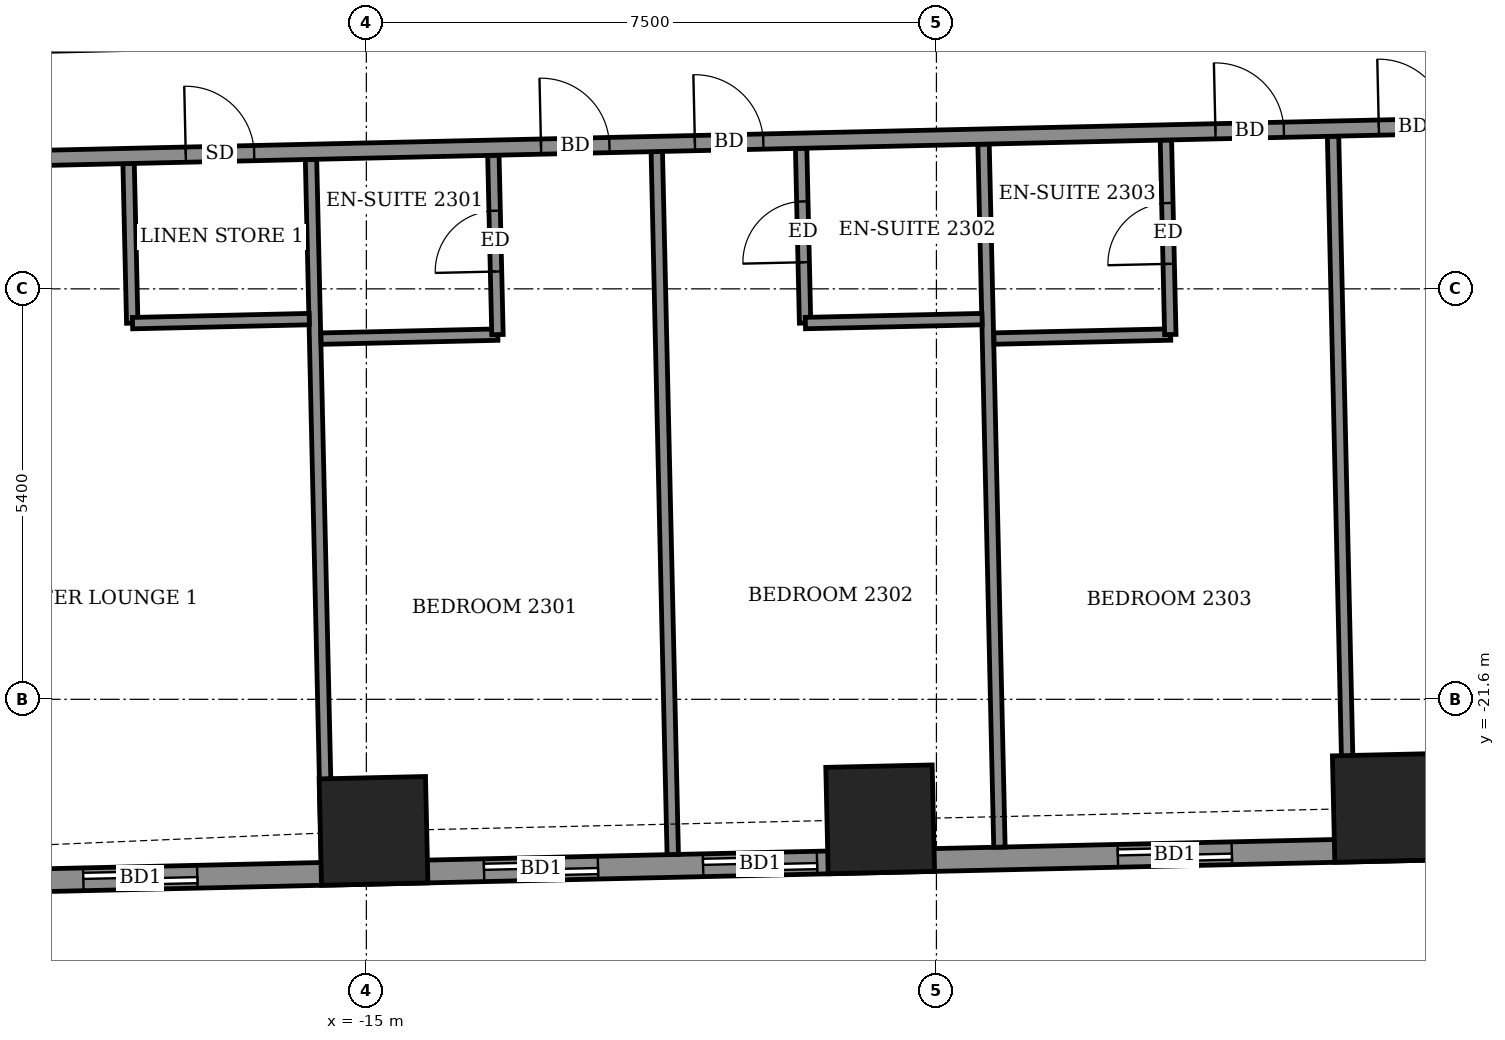
"""IFC4 building model, lengths in metres.
Left out: names, types, materials, properties, quantities, classifications, styles, units other than length and angle.
Written with IfcOpenShell. Run it as: python <this file> out.ifc"""

import sys

from ifc_helpers import new_model, si_unit, direction, frame, frame_2d, origin, origin_2d, place, context, subcontext, project, spatial, rectangle, extrude, element, fill, save


model = new_model("IFC4")
c1 = context("Model", 3, precision=1e-05, world=origin(), true_north=direction((0.0, 1.0)))
c2 = subcontext(c1, "Body", "Model", "MODEL_VIEW")
j1 = project(units=[si_unit("LENGTHUNIT", "METRE"), si_unit("PLANEANGLEUNIT", "RADIAN")], contexts=[c1])
p1 = place(None, origin())
s1 = spatial("IfcSite", under=j1, at=p1, CompositionType="ELEMENT")
p2 = place(p1, origin())
s2 = spatial("IfcBuilding", under=s1, at=p2, CompositionType="ELEMENT")
p3 = place(p2, frame((0.0, 0.0, 93.7)))
s3 = spatial("IfcBuildingStorey", under=s2, at=p3, CompositionType="ELEMENT", Elevation=93.7)
for number, where, z_axis, x_axis in (
    (1, (-14.906, -23.331, -0.55), (0.0, 0.0, 1.0), (1.0, 0.023, 0.0)),
    (2, (-8.24, -23.179, -0.55), (0.0, 0.0, 1.0), (1.0, 0.023, 0.0)),
    (3, (-1.575, -23.028, -0.55), (0.0, 0.0, 1.0), (1.0, 0.023, 0.0)),
):
    element("IfcColumn", number, at=place(p3, frame(where, z_axis=z_axis, x_axis=x_axis)), inside=s3, PredefinedType="COLUMN", context=c2, shape_type="SweptSolid", body=[
        extrude(rectangle(XDim=1.4, YDim=1.4, at=origin_2d()), origin(), (0.0, 0.0, 1.0), 3.6),
    ])
p4 = place(p3, frame((-21.409, -24.029, 0.0), z_axis=(0.0, 0.0, 1.0), x_axis=(0.999742634032, 0.022686244721, 0.0)))
e4 = element("IfcWall", 4, at=p4, inside=s3, PredefinedType="SOLIDWALL", context=c2, shape_type="SweptSolid", body=[
    extrude(rectangle(XDim=46.372, YDim=0.3, at=frame_2d((23.186, 0.0))), origin(), (0.0, 0.0, 1.0), 3.05),
])
p5 = place(p4, frame((2.686, 0.0, 0.0)))
e5 = element("IfcOpeningElement", 5, at=p5, cuts=e4, PredefinedType="OPENING", context=c2, shape_type="SweptSolid", body=[
    extrude(rectangle(XDim=1.5, YDim=2.4, at=frame_2d((0.75, 1.2))), frame((0.0, 0.16, 0.0), z_axis=(0.0, -1.0, 0.0), x_axis=(1.0, 0.0, 0.0)), (0.0, 0.0, 1.0), 0.32),
])
p6 = place(p4, frame((7.959, 0.0, 0.0)))
e6 = element("IfcOpeningElement", 6, at=p6, cuts=e4, PredefinedType="OPENING", context=c2, shape_type="SweptSolid", body=[
    extrude(rectangle(XDim=1.5, YDim=2.4, at=frame_2d((0.75, 1.2))), frame((0.0, 0.16, 0.0), z_axis=(0.0, -1.0, 0.0), x_axis=(1.0, 0.0, 0.0)), (0.0, 0.0, 1.0), 0.32),
])
p7 = place(p4, frame((10.842, 0.0, 0.0)))
e7 = element("IfcOpeningElement", 7, at=p7, cuts=e4, PredefinedType="OPENING", context=c2, shape_type="SweptSolid", body=[
    extrude(rectangle(XDim=1.5, YDim=2.4, at=frame_2d((0.75, 1.2))), frame((0.0, 0.16, 0.0), z_axis=(0.0, -1.0, 0.0), x_axis=(1.0, 0.0, 0.0)), (0.0, 0.0, 1.0), 0.32),
])
p8 = place(p4, frame((16.3, 0.0, 0.0)))
e8 = element("IfcOpeningElement", 8, at=p8, cuts=e4, PredefinedType="OPENING", context=c2, shape_type="SweptSolid", body=[
    extrude(rectangle(XDim=1.5, YDim=2.4, at=frame_2d((0.75, 1.2))), frame((0.0, 0.16, 0.0), z_axis=(0.0, -1.0, 0.0), x_axis=(1.0, 0.0, 0.0)), (0.0, 0.0, 1.0), 0.32),
])
p9 = place(p4, frame((21.326, 0.0, 0.0)))
e9 = element("IfcOpeningElement", 9, at=p9, cuts=e4, PredefinedType="OPENING", context=c2, shape_type="SweptSolid", body=[
    extrude(rectangle(XDim=1.5, YDim=2.4, at=frame_2d((0.75, 1.2))), frame((0.0, 0.16, 0.0), z_axis=(0.0, -1.0, 0.0), x_axis=(1.0, 0.0, 0.0)), (0.0, 0.0, 1.0), 0.32),
])
p10 = place(p4, frame((24.21, 0.0, 0.0)))
e10 = element("IfcOpeningElement", 10, at=p10, cuts=e4, PredefinedType="OPENING", context=c2, shape_type="SweptSolid", body=[
    extrude(rectangle(XDim=1.5, YDim=2.4, at=frame_2d((0.75, 1.2))), frame((0.0, 0.16, 0.0), z_axis=(0.0, -1.0, 0.0), x_axis=(1.0, 0.0, 0.0)), (0.0, 0.0, 1.0), 0.32),
])
p11 = place(p4, frame((29.769, 0.0, 0.0)))
e11 = element("IfcOpeningElement", 11, at=p11, cuts=e4, PredefinedType="OPENING", context=c2, shape_type="SweptSolid", body=[
    extrude(rectangle(XDim=1.5, YDim=2.4, at=frame_2d((0.75, 1.2))), frame((0.0, 0.16, 0.0), z_axis=(0.0, -1.0, 0.0), x_axis=(1.0, 0.0, 0.0)), (0.0, 0.0, 1.0), 0.32),
])
p12 = place(p4, frame((34.819, 0.0, 0.0)))
e12 = element("IfcOpeningElement", 12, at=p12, cuts=e4, PredefinedType="OPENING", context=c2, shape_type="SweptSolid", body=[
    extrude(rectangle(XDim=1.5, YDim=2.4, at=frame_2d((0.75, 1.2))), frame((0.0, 0.16, 0.0), z_axis=(0.0, -1.0, 0.0), x_axis=(1.0, 0.0, 0.0)), (0.0, 0.0, 1.0), 0.32),
])
p13 = place(p4, frame((37.852, 0.0, 0.0)))
e13 = element("IfcOpeningElement", 13, at=p13, cuts=e4, PredefinedType="OPENING", context=c2, shape_type="SweptSolid", body=[
    extrude(rectangle(XDim=1.2, YDim=2.4, at=frame_2d((0.6, 1.2))), frame((0.0, 0.16, 0.0), z_axis=(0.0, -1.0, 0.0), x_axis=(1.0, 0.0, 0.0)), (0.0, 0.0, 1.0), 0.32),
])
p14 = place(p4, frame((42.373, 0.0, 0.9)))
e14 = element("IfcOpeningElement", 14, at=p14, cuts=e4, PredefinedType="OPENING", context=c2, shape_type="SweptSolid", body=[
    extrude(rectangle(XDim=2.4, YDim=1.5, at=frame_2d((1.2, 0.75))), frame((0.0, 0.16, 0.0), z_axis=(0.0, -1.0, 0.0), x_axis=(1.0, 0.0, 0.0)), (0.0, 0.0, 1.0), 0.32),
])
p15 = place(p3, frame((-15.518, -23.745, 0.0), z_axis=(0.0, 0.0, 1.0), x_axis=(-0.022697424684, 0.999742380272, 0.0)))
e15 = element("IfcWall", 15, at=p15, inside=s3, PredefinedType="PARTITIONING", context=c2, shape_type="SweptSolid", body=[
    extrude(rectangle(XDim=9.25, YDim=0.15, at=frame_2d((4.625, 0.0))), origin(), (0.0, 0.0, 1.0), 3.05),
])
p16 = place(p3, frame((-10.969, -23.642, 0.0), z_axis=(0.0, 0.0, 1.0), x_axis=(-0.022697424684, 0.999742380272, 0.0)))
e16 = element("IfcWall", 16, at=p16, inside=s3, PredefinedType="PARTITIONING", context=c2, shape_type="SweptSolid", body=[
    extrude(rectangle(XDim=9.25, YDim=0.15, at=frame_2d((4.625, 0.0))), origin(), (0.0, 0.0, 1.0), 2.55),
])
p17 = place(p3, frame((-6.671, -23.545, 0.0), z_axis=(0.0, 0.0, 1.0), x_axis=(-0.022592505393, 0.999744756775, 0.0)))
e17 = element("IfcWall", 17, at=p17, inside=s3, PredefinedType="PARTITIONING", context=c2, shape_type="SweptSolid", body=[
    extrude(rectangle(XDim=9.25, YDim=0.15, at=frame_2d((4.625, 0.0))), origin(), (0.0, 0.0, 1.0), 2.55),
])
p18 = place(p3, frame((-2.072, -23.44, 0.0), z_axis=(0.0, 0.0, 1.0), x_axis=(-0.022697424684, 0.999742380272, 0.0)))
e18 = element("IfcWall", 18, at=p18, inside=s3, PredefinedType="PARTITIONING", context=c2, shape_type="SweptSolid", body=[
    extrude(rectangle(XDim=9.25, YDim=0.15, at=frame_2d((4.625, 0.0))), origin(), (0.0, 0.0, 1.0), 3.05),
])
p19 = place(p3, frame((-6.743, -16.854, 0.0), z_axis=(0.0, 0.0, 1.0), x_axis=(0.999740260747, 0.02279059109, 0.0)))
e19 = element("IfcWall", 19, at=p19, inside=s3, PredefinedType="PARTITIONING", context=c2, shape_type="SweptSolid", body=[
    extrude(rectangle(XDim=2.324, YDim=0.15, at=frame_2d((1.162, 0.0))), origin(), (0.0, 0.0, 1.0), 3.05),
])
p20 = place(p3, frame((-4.423, -16.801, 0.0), z_axis=(0.0, 0.0, 1.0), x_axis=(-0.022604411713, 0.999744487642, 0.0)))
e20 = element("IfcWall", 20, at=p20, inside=s3, PredefinedType="PARTITIONING", context=c2, shape_type="SweptSolid", body=[
    extrude(rectangle(XDim=2.56, YDim=0.15, at=frame_2d((1.28, 0.0))), origin(), (0.0, 0.0, 1.0), 3.05),
])
p21 = place(p20, frame((0.93, 0.0, 0.0)))
e21 = element("IfcOpeningElement", 21, at=p21, cuts=e20, PredefinedType="OPENING", context=c2, shape_type="SweptSolid", body=[
    extrude(rectangle(XDim=0.8, YDim=2.1, at=frame_2d((0.4, 1.05))), frame((0.0, 0.085, 0.0), z_axis=(0.0, -1.0, 0.0), x_axis=(1.0, 0.0, 0.0)), (0.0, 0.0, 1.0), 0.17),
])
p22 = place(p3, frame((-15.596, -16.855, 0.0), z_axis=(0.0, 0.0, 1.0), x_axis=(0.999740478815, 0.022781023197, 0.0)))
e22 = element("IfcWall", 22, at=p22, inside=s3, PredefinedType="PARTITIONING", context=c2, shape_type="SweptSolid", body=[
    extrude(rectangle(XDim=2.325, YDim=0.15, at=frame_2d((1.163, 0.0))), origin(), (0.0, 0.0, 1.0), 3.05),
])
p23 = place(p3, frame((-13.275, -16.802, 0.0), z_axis=(0.0, 0.0, 1.0), x_axis=(-0.02297054684, 0.999736142178, 0.0)))
e23 = element("IfcWall", 23, at=p23, inside=s3, PredefinedType="PARTITIONING", context=c2, shape_type="SweptSolid", body=[
    extrude(rectangle(XDim=2.36, YDim=0.15, at=frame_2d((1.18, 0.0))), origin(), (0.0, 0.0, 1.0), 3.05),
])
p24 = place(p23, frame((0.83, 0.0, 0.0)))
e24 = element("IfcOpeningElement", 24, at=p24, cuts=e23, PredefinedType="OPENING", context=c2, shape_type="SweptSolid", body=[
    extrude(rectangle(XDim=0.8, YDim=2.1, at=frame_2d((0.4, 1.05))), frame((0.0, 0.085, 0.0), z_axis=(0.0, -1.0, 0.0), x_axis=(1.0, 0.0, 0.0)), (0.0, 0.0, 1.0), 0.17),
])
p25 = place(p3, frame((-9.228, -16.65, 0.0), z_axis=(0.0, 0.0, 1.0), x_axis=(-0.022615284993, 0.999744241736, 0.0)))
e25 = element("IfcWall", 25, at=p25, inside=s3, PredefinedType="PARTITIONING", context=c2, shape_type="SweptSolid", body=[
    extrude(rectangle(XDim=2.299, YDim=0.15, at=frame_2d((1.15, 0.0))), origin(), (0.0, 0.0, 1.0), 3.05),
])
p26 = place(p25, frame((0.8, 0.0, 0.0)))
e26 = element("IfcOpeningElement", 26, at=p26, cuts=e25, PredefinedType="OPENING", context=c2, shape_type="SweptSolid", body=[
    extrude(rectangle(XDim=0.8, YDim=2.1, at=frame_2d((0.4, 1.05))), frame((0.0, 0.085, 0.0), z_axis=(0.0, -1.0, 0.0), x_axis=(1.0, 0.0, 0.0)), (0.0, 0.0, 1.0), 0.17),
])
p27 = place(p3, frame((-9.224, -16.65, 0.0), z_axis=(0.0, 0.0, 1.0), x_axis=(0.999750007167, 0.022358961731, 0.0)))
e27 = element("IfcWall", 27, at=p27, inside=s3, PredefinedType="PARTITIONING", context=c2, shape_type="SweptSolid", body=[
    extrude(rectangle(XDim=2.326, YDim=0.15, at=frame_2d((1.163, 0.0))), origin(), (0.0, 0.0, 1.0), 3.05),
])
p28 = place(p3, frame((-18.08, -16.651, 0.0), z_axis=(0.0, 0.0, 1.0), x_axis=(-0.022792727877, 0.999740212033, 0.0)))
e28 = element("IfcWall", 28, at=p28, inside=s3, PredefinedType="PARTITIONING", context=c2, shape_type="SweptSolid", body=[
    extrude(rectangle(XDim=2.099, YDim=0.15, at=frame_2d((1.05, 0.0))), origin(), (0.0, 0.0, 1.0), 3.05),
])
p29 = place(p3, frame((-18.076, -16.651, 0.0), z_axis=(0.0, 0.0, 1.0), x_axis=(0.999740478815, 0.022781023197, 0.0)))
e29 = element("IfcWall", 29, at=p29, inside=s3, PredefinedType="PARTITIONING", context=c2, shape_type="SweptSolid", body=[
    extrude(rectangle(XDim=2.325, YDim=0.15, at=frame_2d((1.163, 0.0))), origin(), (0.0, 0.0, 1.0), 3.05),
])
p30 = place(p3, frame((-24.274, -14.591, 0.0), z_axis=(0.0, 0.0, 1.0), x_axis=(0.999742718753, 0.022682510909, 0.0)))
e30 = element("IfcWall", 30, at=p30, inside=s3, PredefinedType="PARTITIONING", context=c2, shape_type="SweptSolid", body=[
    extrude(rectangle(XDim=52.471, YDim=0.2, at=frame_2d((26.236, 0.0))), origin(), (0.0, 0.0, 1.0), 3.05),
])
p31 = place(p30, frame((1.525, 0.0, 0.0)))
e31 = element("IfcOpeningElement", 31, at=p31, cuts=e30, PredefinedType="OPENING", context=c2, shape_type="SweptSolid", body=[
    extrude(rectangle(XDim=1.0, YDim=2.1, at=frame_2d((0.5, 1.05))), frame((0.0, 0.11, 0.0), z_axis=(0.0, -1.0, 0.0), x_axis=(1.0, 0.0, 0.0)), (0.0, 0.0, 1.0), 0.22),
])
p32 = place(p30, frame((6.9, 0.0, 0.0)))
e32 = element("IfcOpeningElement", 32, at=p32, cuts=e30, PredefinedType="OPENING", context=c2, shape_type="SweptSolid", body=[
    extrude(rectangle(XDim=0.9, YDim=2.1, at=frame_2d((0.45, 1.05))), frame((0.0, 0.11, 0.0), z_axis=(0.0, -1.0, 0.0), x_axis=(1.0, 0.0, 0.0)), (0.0, 0.0, 1.0), 0.22),
])
p33 = place(p30, frame((11.575, 0.0, 0.0)))
e33 = element("IfcOpeningElement", 33, at=p33, cuts=e30, PredefinedType="OPENING", context=c2, shape_type="SweptSolid", body=[
    extrude(rectangle(XDim=0.9, YDim=2.1, at=frame_2d((0.45, 1.05))), frame((0.0, 0.11, 0.0), z_axis=(0.0, -1.0, 0.0), x_axis=(1.0, 0.0, 0.0)), (0.0, 0.0, 1.0), 0.22),
])
p34 = place(p30, frame((13.6, 0.0, 0.0)))
e34 = element("IfcOpeningElement", 34, at=p34, cuts=e30, PredefinedType="OPENING", context=c2, shape_type="SweptSolid", body=[
    extrude(rectangle(XDim=0.9, YDim=2.1, at=frame_2d((0.45, 1.05))), frame((0.0, 0.11, 0.0), z_axis=(0.0, -1.0, 0.0), x_axis=(1.0, 0.0, 0.0)), (0.0, 0.0, 1.0), 0.22),
])
p35 = place(p30, frame((20.45, 0.0, 0.0)))
e35 = element("IfcOpeningElement", 35, at=p35, cuts=e30, PredefinedType="OPENING", context=c2, shape_type="SweptSolid", body=[
    extrude(rectangle(XDim=0.9, YDim=2.1, at=frame_2d((0.45, 1.05))), frame((0.0, 0.11, 0.0), z_axis=(0.0, -1.0, 0.0), x_axis=(1.0, 0.0, 0.0)), (0.0, 0.0, 1.0), 0.22),
])
p36 = place(p30, frame((22.6, 0.0, 0.0)))
e36 = element("IfcOpeningElement", 36, at=p36, cuts=e30, PredefinedType="OPENING", context=c2, shape_type="SweptSolid", body=[
    extrude(rectangle(XDim=0.9, YDim=2.1, at=frame_2d((0.45, 1.05))), frame((0.0, 0.11, 0.0), z_axis=(0.0, -1.0, 0.0), x_axis=(1.0, 0.0, 0.0)), (0.0, 0.0, 1.0), 0.22),
])
p37 = place(p30, frame((29.475, 0.0, 0.0)))
e37 = element("IfcOpeningElement", 37, at=p37, cuts=e30, PredefinedType="OPENING", context=c2, shape_type="SweptSolid", body=[
    extrude(rectangle(XDim=0.9, YDim=2.1, at=frame_2d((0.45, 1.05))), frame((0.0, 0.11, 0.0), z_axis=(0.0, -1.0, 0.0), x_axis=(1.0, 0.0, 0.0)), (0.0, 0.0, 1.0), 0.22),
])
p38 = place(p30, frame((31.675, 0.0, 0.0)))
e38 = element("IfcOpeningElement", 38, at=p38, cuts=e30, PredefinedType="OPENING", context=c2, shape_type="SweptSolid", body=[
    extrude(rectangle(XDim=0.9, YDim=2.1, at=frame_2d((0.45, 1.05))), frame((0.0, 0.11, 0.0), z_axis=(0.0, -1.0, 0.0), x_axis=(1.0, 0.0, 0.0)), (0.0, 0.0, 1.0), 0.22),
])
p39 = place(p30, frame((38.675, 0.0, 0.0)))
e39 = element("IfcOpeningElement", 39, at=p39, cuts=e30, PredefinedType="OPENING", context=c2, shape_type="SweptSolid", body=[
    extrude(rectangle(XDim=0.9, YDim=2.1, at=frame_2d((0.45, 1.05))), frame((0.0, 0.11, 0.0), z_axis=(0.0, -1.0, 0.0), x_axis=(1.0, 0.0, 0.0)), (0.0, 0.0, 1.0), 0.22),
])
p40 = place(p30, frame((40.675, 0.0, 0.0)))
e40 = element("IfcOpeningElement", 40, at=p40, cuts=e30, PredefinedType="OPENING", context=c2, shape_type="SweptSolid", body=[
    extrude(rectangle(XDim=0.9, YDim=2.1, at=frame_2d((0.45, 1.05))), frame((0.0, 0.11, 0.0), z_axis=(0.0, -1.0, 0.0), x_axis=(1.0, 0.0, 0.0)), (0.0, 0.0, 1.0), 0.22),
])
p41 = place(p30, frame((50.436, 0.0, 0.0)))
e41 = element("IfcOpeningElement", 41, at=p41, cuts=e30, PredefinedType="OPENING", context=c2, shape_type="SweptSolid", body=[
    extrude(rectangle(XDim=1.0, YDim=2.1, at=frame_2d((0.5, 1.05))), frame((0.0, 0.11, 0.0), z_axis=(0.0, -1.0, 0.0), x_axis=(1.0, 0.0, 0.0)), (0.0, 0.0, 1.0), 0.22),
])
p42 = place(p30, frame((45.45, 0.0, 0.0)))
e42 = element("IfcOpeningElement", 42, at=p42, cuts=e30, PredefinedType="OPENING", context=c2, shape_type="SweptSolid", body=[
    extrude(rectangle(XDim=0.9, YDim=2.1, at=frame_2d((0.45, 1.05))), frame((0.0, 0.11, 0.0), z_axis=(0.0, -1.0, 0.0), x_axis=(1.0, 0.0, 0.0)), (0.0, 0.0, 1.0), 0.22),
])
p43 = place(p3, frame((-24.308, -13.092, 0.0), z_axis=(0.0, 0.0, 1.0), x_axis=(0.999739800004, 0.022810793222, 0.0)))
e43 = element("IfcWall", 43, at=p43, inside=s3, PredefinedType="PARTITIONING", context=c2, shape_type="SweptSolid", body=[
    extrude(rectangle(XDim=7.631, YDim=0.2, at=frame_2d((3.815, 0.0))), origin(), (0.0, 0.0, 1.0), 3.05),
])
p44 = place(p5, origin())
e44 = element("IfcDoor", 44, at=p44, inside=s3, OperationType="SLIDING_TO_LEFT", PredefinedType="DOOR", context=c2, shape_type="SweptSolid", body=[
    extrude(rectangle(XDim=1.5, YDim=2.4, at=frame_2d((0.75, 1.2))), frame((0.0, 0.025, 0.0), z_axis=(0.0, -1.0, 0.0), x_axis=(1.0, 0.0, 0.0)), (0.0, 0.0, 1.0), 0.05),
])
fill(e5, e44)
p45 = place(p6, origin())
e45 = element("IfcDoor", 45, at=p45, inside=s3, OperationType="SLIDING_TO_LEFT", PredefinedType="DOOR", context=c2, shape_type="SweptSolid", body=[
    extrude(rectangle(XDim=1.5, YDim=2.4, at=frame_2d((0.75, 1.2))), frame((0.0, 0.025, 0.0), z_axis=(0.0, -1.0, 0.0), x_axis=(1.0, 0.0, 0.0)), (0.0, 0.0, 1.0), 0.05),
])
fill(e6, e45)
p46 = place(p7, origin())
e46 = element("IfcDoor", 46, at=p46, inside=s3, OperationType="SLIDING_TO_LEFT", PredefinedType="DOOR", context=c2, shape_type="SweptSolid", body=[
    extrude(rectangle(XDim=1.5, YDim=2.4, at=frame_2d((0.75, 1.2))), frame((0.0, 0.025, 0.0), z_axis=(0.0, -1.0, 0.0), x_axis=(1.0, 0.0, 0.0)), (0.0, 0.0, 1.0), 0.05),
])
fill(e7, e46)
p47 = place(p8, origin())
e47 = element("IfcDoor", 47, at=p47, inside=s3, OperationType="SLIDING_TO_LEFT", PredefinedType="DOOR", context=c2, shape_type="SweptSolid", body=[
    extrude(rectangle(XDim=1.5, YDim=2.4, at=frame_2d((0.75, 1.2))), frame((0.0, 0.025, 0.0), z_axis=(0.0, -1.0, 0.0), x_axis=(1.0, 0.0, 0.0)), (0.0, 0.0, 1.0), 0.05),
])
fill(e8, e47)
p48 = place(p32, origin())
e48 = element("IfcDoor", 48, at=p48, inside=s3, OperationType="SINGLE_SWING_LEFT", PredefinedType="DOOR", context=c2, shape_type="SweptSolid", body=[
    extrude(rectangle(XDim=0.9, YDim=2.1, at=frame_2d((0.45, 1.05))), frame((0.0, 0.025, 0.0), z_axis=(0.0, -1.0, 0.0), x_axis=(1.0, 0.0, 0.0)), (0.0, 0.0, 1.0), 0.05),
])
fill(e32, e48)
p49 = place(p33, origin())
e49 = element("IfcDoor", 49, at=p49, inside=s3, OperationType="SINGLE_SWING_LEFT", PredefinedType="DOOR", context=c2, shape_type="SweptSolid", body=[
    extrude(rectangle(XDim=0.9, YDim=2.1, at=frame_2d((0.45, 1.05))), frame((0.0, 0.025, 0.0), z_axis=(0.0, -1.0, 0.0), x_axis=(1.0, 0.0, 0.0)), (0.0, 0.0, 1.0), 0.05),
])
fill(e33, e49)
p50 = place(p24, origin())
e50 = element("IfcDoor", 50, at=p50, inside=s3, OperationType="SINGLE_SWING_LEFT", PredefinedType="DOOR", context=c2, shape_type="SweptSolid", body=[
    extrude(rectangle(XDim=0.8, YDim=2.1, at=frame_2d((0.4, 1.05))), frame((0.0, 0.025, 0.0), z_axis=(0.0, -1.0, 0.0), x_axis=(1.0, 0.0, 0.0)), (0.0, 0.0, 1.0), 0.05),
])
fill(e24, e50)
p51 = place(p34, origin())
e51 = element("IfcDoor", 51, at=p51, inside=s3, OperationType="SINGLE_SWING_RIGHT", PredefinedType="DOOR", context=c2, shape_type="SweptSolid", body=[
    extrude(rectangle(XDim=0.9, YDim=2.1, at=frame_2d((0.45, 1.05))), frame((0.0, 0.025, 0.0), z_axis=(0.0, -1.0, 0.0), x_axis=(1.0, 0.0, 0.0)), (0.0, 0.0, 1.0), 0.05),
])
fill(e34, e51)
p52 = place(p26, origin())
e52 = element("IfcDoor", 52, at=p52, inside=s3, OperationType="SINGLE_SWING_RIGHT", PredefinedType="DOOR", context=c2, shape_type="SweptSolid", body=[
    extrude(rectangle(XDim=0.8, YDim=2.1, at=frame_2d((0.4, 1.05))), frame((0.0, 0.025, 0.0), z_axis=(0.0, -1.0, 0.0), x_axis=(1.0, 0.0, 0.0)), (0.0, 0.0, 1.0), 0.05),
])
fill(e26, e52)
p53 = place(p35, origin())
e53 = element("IfcDoor", 53, at=p53, inside=s3, OperationType="SINGLE_SWING_LEFT", PredefinedType="DOOR", context=c2, shape_type="SweptSolid", body=[
    extrude(rectangle(XDim=0.9, YDim=2.1, at=frame_2d((0.45, 1.05))), frame((0.0, 0.025, 0.0), z_axis=(0.0, -1.0, 0.0), x_axis=(1.0, 0.0, 0.0)), (0.0, 0.0, 1.0), 0.05),
])
fill(e35, e53)
p54 = place(p21, origin())
e54 = element("IfcDoor", 54, at=p54, inside=s3, OperationType="SINGLE_SWING_LEFT", PredefinedType="DOOR", context=c2, shape_type="SweptSolid", body=[
    extrude(rectangle(XDim=0.8, YDim=2.1, at=frame_2d((0.4, 1.05))), frame((0.0, 0.025, 0.0), z_axis=(0.0, -1.0, 0.0), x_axis=(1.0, 0.0, 0.0)), (0.0, 0.0, 1.0), 0.05),
])
fill(e21, e54)
p55 = place(p36, origin())
e55 = element("IfcDoor", 55, at=p55, inside=s3, OperationType="SINGLE_SWING_RIGHT", PredefinedType="DOOR", context=c2, shape_type="SweptSolid", body=[
    extrude(rectangle(XDim=0.9, YDim=2.1, at=frame_2d((0.45, 1.05))), frame((0.0, 0.025, 0.0), z_axis=(0.0, -1.0, 0.0), x_axis=(1.0, 0.0, 0.0)), (0.0, 0.0, 1.0), 0.05),
])
fill(e36, e55)
save(model, sys.argv[1])
